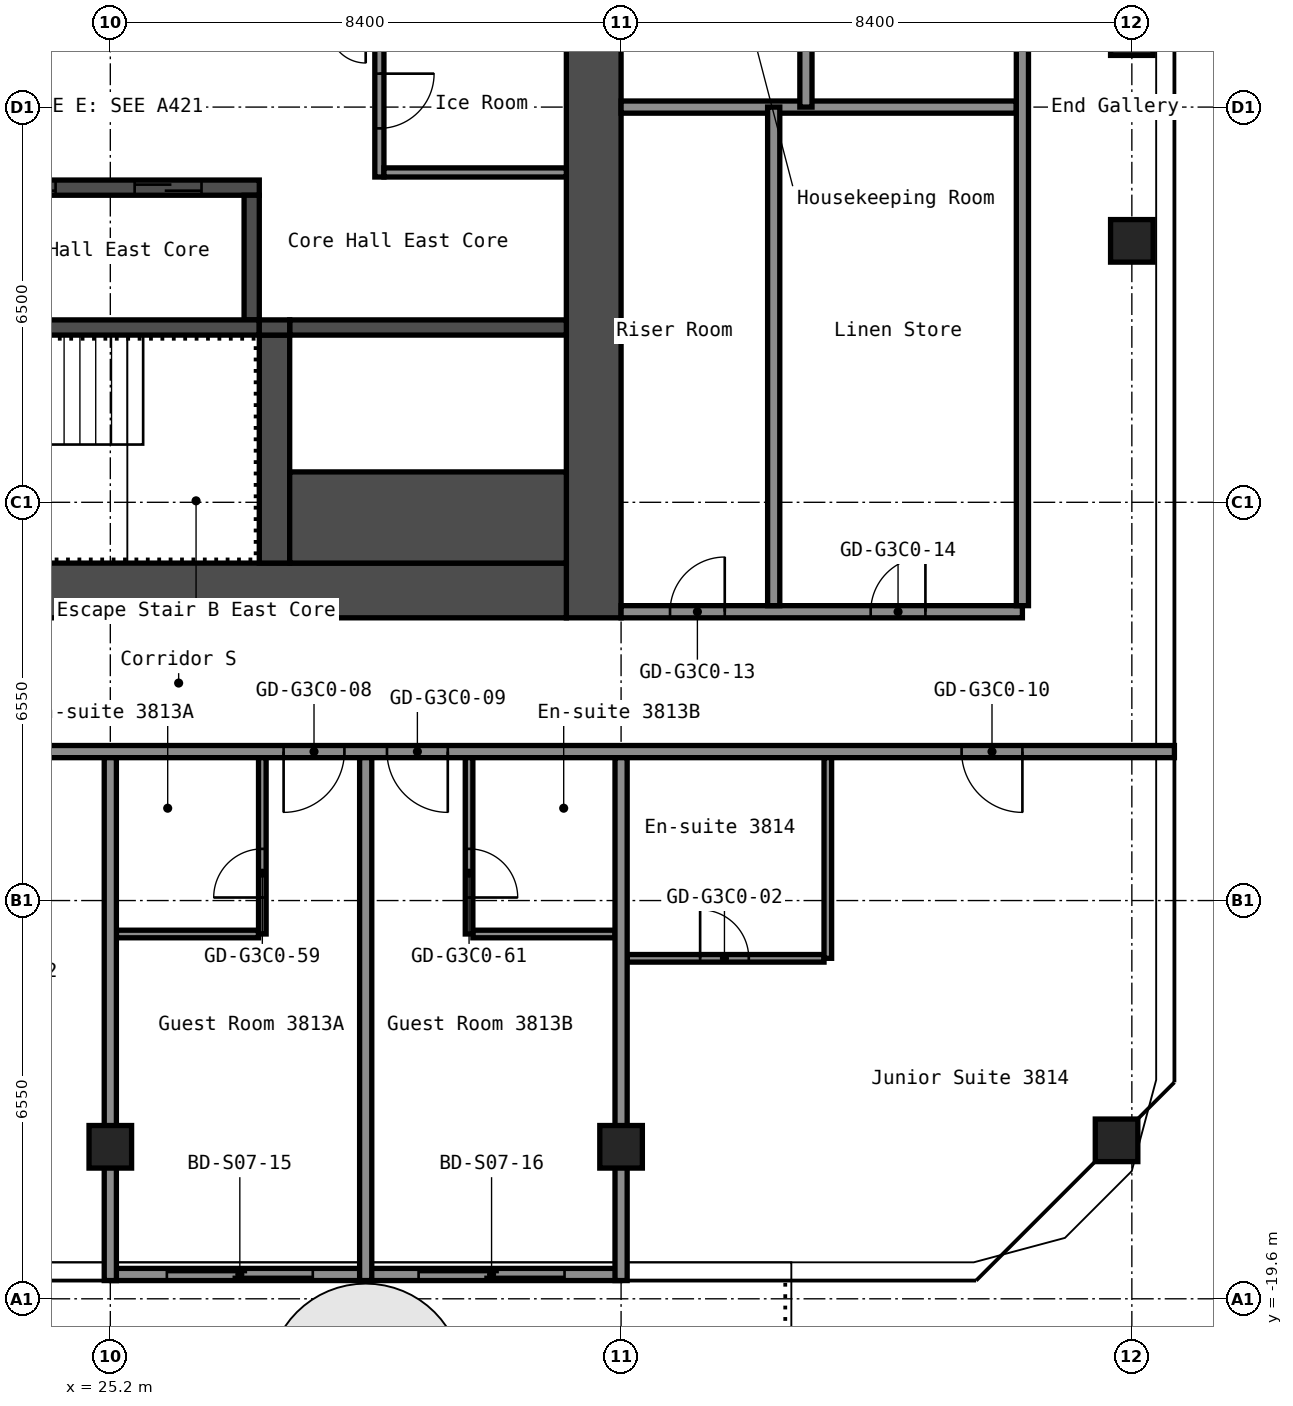
"""IFC4 building model, lengths in metres.
Left out: names, types, materials, properties, quantities, classifications, styles, units other than length and angle.
Written with IfcOpenShell. Run it as: python <this file> out.ifc"""

import sys

from ifc_helpers import new_model, si_unit, direction, frame, frame_2d, origin, origin_2d, place, context, subcontext, project, spatial, rectangle, hollow_rectangle, extrude, element, fill, save


model = new_model("IFC4")
c1 = context("Model", 3, precision=1e-05, world=origin(), true_north=direction((0.0, 1.0)))
c2 = subcontext(c1, "Body", "Model", "MODEL_VIEW")
j1 = project(units=[si_unit("LENGTHUNIT", "METRE"), si_unit("PLANEANGLEUNIT", "RADIAN")], contexts=[c1])
p1 = place(None, origin())
s1 = spatial("IfcSite", under=j1, at=p1, CompositionType="ELEMENT")
p2 = place(p1, origin())
s2 = spatial("IfcBuilding", under=s1, at=p2, CompositionType="ELEMENT")
p3 = place(p2, frame((0.0, 0.0, 137.4)))
s3 = spatial("IfcBuildingStorey", under=s2, at=p3, CompositionType="ELEMENT", Elevation=137.4)
for number, where, z_axis, x_axis in (
    (1, (25.2, -17.1, 0.0), (0.0, 0.0, 1.0), (1.0, 0.0, 0.0)),
    (2, (33.6, -17.1, 0.0), (0.0, 0.0, 1.0), (1.0, 0.0, 0.0)),
    (3, (41.749, -16.994, 0.0), (0.0, 0.0, 1.0), (1.0, 0.0, 0.0)),
    (4, (42.0, -2.2, 0.0), (0.0, 0.0, 1.0), (1.0, 0.0, 0.0)),
    (5, (42.0, 1.2, 0.0), (0.0, 0.0, 1.0), (1.0, 0.0, 0.0)),
):
    element("IfcColumn", number, at=place(p3, frame(where, z_axis=z_axis, x_axis=x_axis)), inside=s3, PredefinedType="COLUMN", context=c2, shape_type="SweptSolid", body=[
        extrude(hollow_rectangle(XDim=0.7, YDim=0.7, WallThickness=0.028, at=origin_2d()), origin(), (0.0, 0.0, 1.0), 2.75),
    ])
p4 = place(p3, frame((33.15, -8.4, 0.0), z_axis=(0.0, 0.0, 1.0), x_axis=(0.0, 1.0, 0.0)))
e6 = element("IfcWall", 6, at=p4, inside=s3, PredefinedType="SHEAR", context=c2, shape_type="SweptSolid", body=[
    extrude(rectangle(XDim=16.8, YDim=0.9, at=frame_2d((8.4, 0.0))), origin(), (0.0, 0.0, 1.0), 2.75),
])
p5 = place(p3, frame((17.7, -7.95, 0.0), z_axis=(0.0, 0.0, 1.0), x_axis=(1.0, 0.0, 0.0)))
e7 = element("IfcWall", 7, at=p5, inside=s3, PredefinedType="SHEAR", context=c2, shape_type="SweptSolid", body=[
    extrude(rectangle(XDim=15.0, YDim=0.9, at=frame_2d((7.5, 0.0))), origin(), (0.0, 0.0, 1.0), 2.75),
])
p6 = place(p5, frame((2.55, 0.0, 0.0)))
e8 = element("IfcOpeningElement", 8, at=p6, cuts=e7, PredefinedType="OPENING", context=c2, shape_type="SweptSolid", body=[
    extrude(rectangle(XDim=1.0, YDim=2.1, at=frame_2d((0.5, 1.05))), frame((0.0, 0.46, 0.0), z_axis=(0.0, -1.0, 0.0), x_axis=(1.0, 0.0, 0.0)), (0.0, 0.0, 1.0), 0.92),
])
p7 = place(p3, frame((20.15, -1.325, 0.0), z_axis=(0.0, 0.0, 1.0), x_axis=(1.0, 0.0, 0.0)))
e9 = element("IfcWall", 9, at=p7, inside=s3, PredefinedType="SHEAR", context=c2, shape_type="SweptSolid", body=[
    extrude(rectangle(XDim=7.5, YDim=0.25, at=frame_2d((3.75, 0.0))), origin(), (0.0, 0.0, 1.0), 2.75),
])
p8 = place(p7, frame((0.65, 0.0, 0.0)))
e10 = element("IfcOpeningElement", 10, at=p8, cuts=e9, PredefinedType="OPENING", context=c2, shape_type="SweptSolid", body=[
    extrude(rectangle(XDim=1.1, YDim=2.1, at=frame_2d((0.55, 1.05))), frame((0.0, 0.135, 0.0), z_axis=(0.0, -1.0, 0.0), x_axis=(1.0, 0.0, 0.0)), (0.0, 0.0, 1.0), 0.27),
])
p9 = place(p7, frame((3.05, 0.0, 0.0)))
e11 = element("IfcOpeningElement", 11, at=p9, cuts=e9, PredefinedType="OPENING", context=c2, shape_type="SweptSolid", body=[
    extrude(rectangle(XDim=1.1, YDim=2.1, at=frame_2d((0.55, 1.05))), frame((0.0, 0.135, 0.0), z_axis=(0.0, -1.0, 0.0), x_axis=(1.0, 0.0, 0.0)), (0.0, 0.0, 1.0), 0.27),
])
p10 = place(p7, frame((5.45, 0.0, 0.0)))
e12 = element("IfcOpeningElement", 12, at=p10, cuts=e9, PredefinedType="OPENING", context=c2, shape_type="SweptSolid", body=[
    extrude(rectangle(XDim=1.1, YDim=2.1, at=frame_2d((0.55, 1.05))), frame((0.0, 0.135, 0.0), z_axis=(0.0, -1.0, 0.0), x_axis=(1.0, 0.0, 0.0)), (0.0, 0.0, 1.0), 0.27),
])
p11 = place(p3, frame((27.525, -3.5, 0.0), z_axis=(0.0, 0.0, 1.0), x_axis=(0.0, 1.0, 0.0)))
e13 = element("IfcWall", 13, at=p11, inside=s3, PredefinedType="SHEAR", context=c2, shape_type="SweptSolid", body=[
    extrude(rectangle(XDim=2.05, YDim=0.25, at=frame_2d((1.025, 0.0))), origin(), (0.0, 0.0, 1.0), 2.75),
])
p12 = place(p3, frame((20.15, -3.625, 0.0), z_axis=(0.0, 0.0, 1.0), x_axis=(1.0, 0.0, 0.0)))
e14 = element("IfcWall", 14, at=p12, inside=s3, PredefinedType="SHEAR", context=c2, shape_type="SweptSolid", body=[
    extrude(rectangle(XDim=7.5, YDim=0.25, at=frame_2d((3.75, 0.0))), origin(), (0.0, 0.0, 1.0), 2.75),
])
p13 = place(p3, frame((27.9, -7.5, 0.0), z_axis=(0.0, 0.0, 1.0), x_axis=(0.0, 1.0, 0.0)))
e15 = element("IfcWall", 15, at=p13, inside=s3, PredefinedType="SHEAR", context=c2, shape_type="SweptSolid", body=[
    extrude(rectangle(XDim=3.75, YDim=0.5, at=frame_2d((1.875, 0.0))), origin(), (0.0, 0.0, 1.0), 2.75),
])
p14 = place(p3, frame((28.15, -3.625, 0.0), z_axis=(0.0, 0.0, 1.0), x_axis=(1.0, 0.0, 0.0)))
e16 = element("IfcWall", 16, at=p14, inside=s3, PredefinedType="SHEAR", context=c2, shape_type="SweptSolid", body=[
    extrude(rectangle(XDim=4.55, YDim=0.25, at=frame_2d((2.275, 0.0))), origin(), (0.0, 0.0, 1.0), 2.75),
])
p15 = place(p3, frame((28.15, -6.75, 0.0), z_axis=(0.0, 0.0, 1.0), x_axis=(1.0, 0.0, 0.0)))
e17 = element("IfcWall", 17, at=p15, inside=s3, PredefinedType="SHEAR", context=c2, shape_type="SweptSolid", body=[
    extrude(rectangle(XDim=4.55, YDim=1.5, at=frame_2d((2.275, 0.0))), origin(), (0.0, 0.0, 1.0), 2.75),
])
p16 = place(p3, frame((27.65, -3.625, 0.0), z_axis=(0.0, 0.0, 1.0), x_axis=(1.0, 0.0, 0.0)))
e18 = element("IfcWall", 18, at=p16, inside=s3, PredefinedType="SHEAR", context=c2, shape_type="SweptSolid", body=[
    extrude(rectangle(XDim=0.5, YDim=0.25, at=frame_2d((0.25, 0.0))), origin(), (0.0, 0.0, 1.0), 2.75),
])
p17 = place(p3, frame((29.625, -1.15, 0.0), z_axis=(0.0, 0.0, 1.0), x_axis=(0.0, 1.0, 0.0)))
e19 = element("IfcWall", 19, at=p17, inside=s3, PredefinedType="PARTITIONING", context=c2, shape_type="SweptSolid", body=[
    extrude(rectangle(XDim=2.35, YDim=0.15, at=frame_2d((1.175, 0.0))), origin(), (0.0, 0.0, 1.0), 2.75),
])
p18 = place(p17, frame((0.8, 0.0, 0.0)))
e20 = element("IfcOpeningElement", 20, at=p18, cuts=e19, PredefinedType="OPENING", context=c2, shape_type="SweptSolid", body=[
    extrude(rectangle(XDim=0.9, YDim=2.1, at=frame_2d((0.45, 1.05))), frame((0.0, 0.085, 0.0), z_axis=(0.0, -1.0, 0.0), x_axis=(1.0, 0.0, 0.0)), (0.0, 0.0, 1.0), 0.17),
])
p19 = place(p3, frame((29.7, -1.075, 0.0), z_axis=(0.0, 0.0, 1.0), x_axis=(1.0, 0.0, 0.0)))
e21 = element("IfcWall", 21, at=p19, inside=s3, PredefinedType="PARTITIONING", context=c2, shape_type="SweptSolid", body=[
    extrude(rectangle(XDim=3.0, YDim=0.15, at=frame_2d((1.5, 0.0))), origin(), (0.0, 0.0, 1.0), 2.75),
])
p20 = place(p3, frame((33.7, -14.0, 0.0), z_axis=(0.0, 0.0, 1.0), x_axis=(1.0, 0.0, 0.0)))
e22 = element("IfcWall", 22, at=p20, inside=s3, PredefinedType="PARTITIONING", context=c2, shape_type="SweptSolid", body=[
    extrude(rectangle(XDim=3.238, YDim=0.125, at=frame_2d((1.619, 0.0))), origin(), (0.0, 0.0, 1.0), 2.75),
])
p21 = place(p20, frame((1.2, 0.0, 0.0)))
e23 = element("IfcOpeningElement", 23, at=p21, cuts=e22, PredefinedType="OPENING", context=c2, shape_type="SweptSolid", body=[
    extrude(rectangle(XDim=0.8, YDim=2.1, at=frame_2d((0.4, 1.05))), frame((0.0, 0.073, 0.0), z_axis=(0.0, -1.0, 0.0), x_axis=(1.0, 0.0, 0.0)), (0.0, 0.0, 1.0), 0.145),
])
for number, where, z_axis, x_axis in (
    (24, (25.3, -13.6, 0.0), (0.0, 0.0, 1.0), (1.0, 0.0, 0.0)),
    (25, (31.163, -13.6, 0.0), (0.0, 0.0, 1.0), (1.0, 0.0, 0.0)),
):
    element("IfcWall", number, at=place(p3, frame(where, z_axis=z_axis, x_axis=x_axis)), inside=s3, PredefinedType="PARTITIONING", context=c2, shape_type="SweptSolid", body=[
        extrude(rectangle(XDim=2.337, YDim=0.125, at=frame_2d((1.169, 0.0))), origin(), (0.0, 0.0, 1.0), 2.75),
    ])
p22 = place(p3, frame((16.8, -10.6, 0.0), z_axis=(0.0, 0.0, 1.0), x_axis=(1.0, 0.0, 0.0)))
e26 = element("IfcWall", 26, at=p22, inside=s3, PredefinedType="PARTITIONING", context=c2, shape_type="SweptSolid", body=[
    extrude(rectangle(XDim=25.9, YDim=0.2, at=frame_2d((12.95, 0.0))), origin(), (0.0, 0.0, 1.0), 2.75),
])
p23 = place(p22, frame((5.4, 0.0, 0.0)))
e27 = element("IfcOpeningElement", 27, at=p23, cuts=e26, PredefinedType="OPENING", context=c2, shape_type="SweptSolid", body=[
    extrude(rectangle(XDim=1.0, YDim=2.1, at=frame_2d((0.5, 1.05))), frame((0.0, 0.11, 0.0), z_axis=(0.0, -1.0, 0.0), x_axis=(1.0, 0.0, 0.0)), (0.0, 0.0, 1.0), 0.22),
])
p24 = place(p22, frame((11.25, 0.0, 0.0)))
e28 = element("IfcOpeningElement", 28, at=p24, cuts=e26, PredefinedType="OPENING", context=c2, shape_type="SweptSolid", body=[
    extrude(rectangle(XDim=1.0, YDim=2.1, at=frame_2d((0.5, 1.05))), frame((0.0, 0.11, 0.0), z_axis=(0.0, -1.0, 0.0), x_axis=(1.0, 0.0, 0.0)), (0.0, 0.0, 1.0), 0.22),
])
p25 = place(p22, frame((12.95, 0.0, 0.0)))
e29 = element("IfcOpeningElement", 29, at=p25, cuts=e26, PredefinedType="OPENING", context=c2, shape_type="SweptSolid", body=[
    extrude(rectangle(XDim=1.0, YDim=2.1, at=frame_2d((0.5, 1.05))), frame((0.0, 0.11, 0.0), z_axis=(0.0, -1.0, 0.0), x_axis=(1.0, 0.0, 0.0)), (0.0, 0.0, 1.0), 0.22),
])
p26 = place(p22, frame((22.4, 0.0, 0.0)))
e30 = element("IfcOpeningElement", 30, at=p26, cuts=e26, PredefinedType="OPENING", context=c2, shape_type="SweptSolid", body=[
    extrude(rectangle(XDim=1.0, YDim=2.1, at=frame_2d((0.5, 1.05))), frame((0.0, 0.11, 0.0), z_axis=(0.0, -1.0, 0.0), x_axis=(1.0, 0.0, 0.0)), (0.0, 0.0, 1.0), 0.22),
])
p27 = place(p3, frame((33.6, -8.3, 0.0), z_axis=(0.0, 0.0, 1.0), x_axis=(1.0, 0.0, 0.0)))
e31 = element("IfcWall", 31, at=p27, inside=s3, PredefinedType="PARTITIONING", context=c2, shape_type="SweptSolid", body=[
    extrude(rectangle(XDim=6.6, YDim=0.2, at=frame_2d((3.3, 0.0))), origin(), (0.0, 0.0, 1.0), 2.75),
])
p28 = place(p27, frame((0.805, 0.0, 0.0)))
e32 = element("IfcOpeningElement", 32, at=p28, cuts=e31, PredefinedType="OPENING", context=c2, shape_type="SweptSolid", body=[
    extrude(rectangle(XDim=0.9, YDim=2.1, at=frame_2d((0.45, 1.05))), frame((0.0, 0.11, 0.0), z_axis=(0.0, -1.0, 0.0), x_axis=(1.0, 0.0, 0.0)), (0.0, 0.0, 1.0), 0.22),
])
p29 = place(p27, frame((4.105, 0.0, 0.0)))
e33 = element("IfcOpeningElement", 33, at=p29, cuts=e31, PredefinedType="OPENING", context=c2, shape_type="SweptSolid", body=[
    extrude(rectangle(XDim=0.9, YDim=2.1, at=frame_2d((0.45, 1.05))), frame((0.0, 0.11, 0.0), z_axis=(0.0, -1.0, 0.0), x_axis=(1.0, 0.0, 0.0)), (0.0, 0.0, 1.0), 0.22),
])
p30 = place(p3, frame((33.6, 0.0, 0.0), z_axis=(0.0, 0.0, 1.0), x_axis=(1.0, 0.0, 0.0)))
e34 = element("IfcWall", 34, at=p30, inside=s3, PredefinedType="PARTITIONING", context=c2, shape_type="SweptSolid", body=[
    extrude(rectangle(XDim=6.5, YDim=0.2, at=frame_2d((3.25, 0.0))), origin(), (0.0, 0.0, 1.0), 2.75),
])
p31 = place(p3, frame((25.2, -19.3, 0.0), z_axis=(0.0, 0.0, 1.0), x_axis=(0.0, 1.0, 0.0)))
e35 = element("IfcWall", 35, at=p31, inside=s3, PredefinedType="PARTITIONING", context=c2, shape_type="SweptSolid", body=[
    extrude(rectangle(XDim=8.6, YDim=0.2, at=frame_2d((4.3, 0.0))), origin(), (0.0, 0.0, 1.0), 2.75),
])
p32 = place(p3, frame((27.7, -13.6, 0.0), z_axis=(0.0, 0.0, 1.0), x_axis=(0.0, 1.0, 0.0)))
e36 = element("IfcWall", 36, at=p32, inside=s3, PredefinedType="PARTITIONING", context=c2, shape_type="SweptSolid", body=[
    extrude(rectangle(XDim=2.9, YDim=0.125, at=frame_2d((1.45, 0.0))), origin(), (0.0, 0.0, 1.0), 2.75),
])
p33 = place(p32, frame((0.6, 0.0, 0.0)))
e37 = element("IfcOpeningElement", 37, at=p33, cuts=e36, PredefinedType="OPENING", context=c2, shape_type="SweptSolid", body=[
    extrude(rectangle(XDim=0.8, YDim=2.1, at=frame_2d((0.4, 1.05))), frame((0.0, 0.073, 0.0), z_axis=(0.0, -1.0, 0.0), x_axis=(1.0, 0.0, 0.0)), (0.0, 0.0, 1.0), 0.145),
])
p34 = place(p3, frame((29.4, -19.3, 0.0), z_axis=(0.0, 0.0, 1.0), x_axis=(0.0, 1.0, 0.0)))
e38 = element("IfcWall", 38, at=p34, inside=s3, PredefinedType="PARTITIONING", context=c2, shape_type="SweptSolid", body=[
    extrude(rectangle(XDim=8.6, YDim=0.2, at=frame_2d((4.3, 0.0))), origin(), (0.0, 0.0, 1.0), 2.75),
])
p35 = place(p3, frame((31.1, -13.6, 0.0), z_axis=(0.0, 0.0, 1.0), x_axis=(0.0, 1.0, 0.0)))
e39 = element("IfcWall", 39, at=p35, inside=s3, PredefinedType="PARTITIONING", context=c2, shape_type="SweptSolid", body=[
    extrude(rectangle(XDim=2.9, YDim=0.125, at=frame_2d((1.45, 0.0))), origin(), (0.0, 0.0, 1.0), 2.75),
])
p36 = place(p35, frame((0.6, 0.0, 0.0)))
e40 = element("IfcOpeningElement", 40, at=p36, cuts=e39, PredefinedType="OPENING", context=c2, shape_type="SweptSolid", body=[
    extrude(rectangle(XDim=0.8, YDim=2.1, at=frame_2d((0.4, 1.05))), frame((0.0, 0.073, 0.0), z_axis=(0.0, -1.0, 0.0), x_axis=(1.0, 0.0, 0.0)), (0.0, 0.0, 1.0), 0.145),
])
p37 = place(p3, frame((33.6, -19.3, 0.0), z_axis=(0.0, 0.0, 1.0), x_axis=(0.0, 1.0, 0.0)))
e41 = element("IfcWall", 41, at=p37, inside=s3, PredefinedType="PARTITIONING", context=c2, shape_type="SweptSolid", body=[
    extrude(rectangle(XDim=8.6, YDim=0.2, at=frame_2d((4.3, 0.0))), origin(), (0.0, 0.0, 1.0), 2.75),
])
for number, where, z_axis, x_axis in (
    (42, (36.11, -8.2, 0.0), (0.0, 0.0, 1.0), (0.0, 1.0, 0.0)),
    (43, (36.64, 0.0, 0.0), (0.0, 0.0, 1.0), (0.0, 1.0, 0.0)),
):
    element("IfcWall", number, at=place(p3, frame(where, z_axis=z_axis, x_axis=x_axis)), inside=s3, PredefinedType="PARTITIONING", context=c2, shape_type="SweptSolid", body=[
        extrude(rectangle(XDim=8.2, YDim=0.2, at=frame_2d((4.1, 0.0))), origin(), (0.0, 0.0, 1.0), 2.75),
    ])
p38 = place(p3, frame((37.0, -14.0, 0.0), z_axis=(0.0, 0.0, 1.0), x_axis=(0.0, 1.0, 0.0)))
e44 = element("IfcWall", 44, at=p38, inside=s3, PredefinedType="PARTITIONING", context=c2, shape_type="SweptSolid", body=[
    extrude(rectangle(XDim=3.3, YDim=0.125, at=frame_2d((1.65, 0.0))), origin(), (0.0, 0.0, 1.0), 2.75),
])
p39 = place(p3, frame((40.2, -8.2, 0.0), z_axis=(0.0, 0.0, 1.0), x_axis=(0.0, 1.0, 0.0)))
e45 = element("IfcWall", 45, at=p39, inside=s3, PredefinedType="PARTITIONING", context=c2, shape_type="SweptSolid", body=[
    extrude(rectangle(XDim=16.4, YDim=0.2, at=frame_2d((8.2, 0.0))), origin(), (0.0, 0.0, 1.0), 2.75),
])
p40 = place(p3, frame((25.22, -19.2, 0.0), z_axis=(0.0, 0.0, 1.0), x_axis=(1.0, 0.0, 0.0)))
p41 = place(p40, frame((0.91, 0.0, 0.0)))
p42 = place(p41, frame((2.4, 0.0, 0.0), z_axis=(0.0, 0.0, 1.0), x_axis=(-1.0, 0.0, 0.0)))
e46 = element("IfcDoor", 46, at=p42, inside=s3, OperationType="SLIDING_TO_LEFT", PredefinedType="DOOR", context=c2, shape_type="SweptSolid", body=[
    extrude(rectangle(XDim=2.4, YDim=2.2, at=frame_2d((1.2, 1.1))), frame((0.0, 0.025, 0.0), z_axis=(0.0, -1.0, 0.0), x_axis=(1.0, 0.0, 0.0)), (0.0, 0.0, 1.0), 0.05),
])
p43 = place(p3, frame((29.36, -19.2, 0.0), z_axis=(0.0, 0.0, 1.0), x_axis=(1.0, 0.0, 0.0)))
p44 = place(p43, frame((0.91, 0.0, 0.0)))
p45 = place(p44, frame((2.4, 0.0, 0.0), z_axis=(0.0, 0.0, 1.0), x_axis=(-1.0, 0.0, 0.0)))
e47 = element("IfcDoor", 47, at=p45, inside=s3, OperationType="SLIDING_TO_LEFT", PredefinedType="DOOR", context=c2, shape_type="SweptSolid", body=[
    extrude(rectangle(XDim=2.4, YDim=2.2, at=frame_2d((1.2, 1.1))), frame((0.0, 0.025, 0.0), z_axis=(0.0, -1.0, 0.0), x_axis=(1.0, 0.0, 0.0)), (0.0, 0.0, 1.0), 0.05),
])
p46 = place(p18, origin())
e48 = element("IfcDoor", 48, at=p46, inside=s3, OperationType="SINGLE_SWING_RIGHT", PredefinedType="DOOR", context=c2, shape_type="SweptSolid", body=[
    extrude(rectangle(XDim=0.9, YDim=2.1, at=frame_2d((0.45, 1.05))), frame((0.0, 0.025, 0.0), z_axis=(0.0, -1.0, 0.0), x_axis=(1.0, 0.0, 0.0)), (0.0, 0.0, 1.0), 0.05),
])
fill(e20, e48)
p47 = place(p9, origin())
e49 = element("IfcDoor", 49, at=p47, inside=s3, OperationType="DOUBLE_DOOR_SLIDING", PredefinedType="DOOR", context=c2, shape_type="SweptSolid", body=[
    extrude(rectangle(XDim=1.1, YDim=2.1, at=frame_2d((0.55, 1.05))), frame((0.0, 0.025, 0.0), z_axis=(0.0, -1.0, 0.0), x_axis=(1.0, 0.0, 0.0)), (0.0, 0.0, 1.0), 0.05),
])
fill(e11, e49)
p48 = place(p10, origin())
e50 = element("IfcDoor", 50, at=p48, inside=s3, OperationType="DOUBLE_DOOR_SLIDING", PredefinedType="DOOR", context=c2, shape_type="SweptSolid", body=[
    extrude(rectangle(XDim=1.1, YDim=2.1, at=frame_2d((0.55, 1.05))), frame((0.0, 0.025, 0.0), z_axis=(0.0, -1.0, 0.0), x_axis=(1.0, 0.0, 0.0)), (0.0, 0.0, 1.0), 0.05),
])
fill(e12, e50)
p49 = place(p21, origin())
e51 = element("IfcDoor", 51, at=p49, inside=s3, OperationType="SINGLE_SWING_RIGHT", PredefinedType="DOOR", context=c2, shape_type="SweptSolid", body=[
    extrude(rectangle(XDim=0.8, YDim=2.1, at=frame_2d((0.4, 1.05))), frame((0.0, 0.025, 0.0), z_axis=(0.0, -1.0, 0.0), x_axis=(1.0, 0.0, 0.0)), (0.0, 0.0, 1.0), 0.05),
])
fill(e23, e51)
p50 = place(p24, origin())
e52 = element("IfcDoor", 52, at=p50, inside=s3, OperationType="SINGLE_SWING_LEFT", PredefinedType="DOOR", context=c2, shape_type="SweptSolid", body=[
    extrude(rectangle(XDim=1.0, YDim=2.1, at=frame_2d((0.5, 1.05))), frame((0.0, 0.025, 0.0), z_axis=(0.0, -1.0, 0.0), x_axis=(1.0, 0.0, 0.0)), (0.0, 0.0, 1.0), 0.05),
])
fill(e28, e52)
p51 = place(p25, origin())
e53 = element("IfcDoor", 53, at=p51, inside=s3, OperationType="SINGLE_SWING_RIGHT", PredefinedType="DOOR", context=c2, shape_type="SweptSolid", body=[
    extrude(rectangle(XDim=1.0, YDim=2.1, at=frame_2d((0.5, 1.05))), frame((0.0, 0.025, 0.0), z_axis=(0.0, -1.0, 0.0), x_axis=(1.0, 0.0, 0.0)), (0.0, 0.0, 1.0), 0.05),
])
fill(e29, e53)
p52 = place(p26, origin())
e54 = element("IfcDoor", 54, at=p52, inside=s3, OperationType="SINGLE_SWING_RIGHT", PredefinedType="DOOR", context=c2, shape_type="SweptSolid", body=[
    extrude(rectangle(XDim=1.0, YDim=2.1, at=frame_2d((0.5, 1.05))), frame((0.0, 0.025, 0.0), z_axis=(0.0, -1.0, 0.0), x_axis=(1.0, 0.0, 0.0)), (0.0, 0.0, 1.0), 0.05),
])
fill(e30, e54)
p53 = place(p28, origin())
e55 = element("IfcDoor", 55, at=p53, inside=s3, OperationType="SINGLE_SWING_LEFT", PredefinedType="DOOR", context=c2, shape_type="SweptSolid", body=[
    extrude(rectangle(XDim=0.9, YDim=2.1, at=frame_2d((0.45, 1.05))), frame((0.0, 0.025, 0.0), z_axis=(0.0, -1.0, 0.0), x_axis=(1.0, 0.0, 0.0)), (0.0, 0.0, 1.0), 0.05),
])
fill(e32, e55)
p54 = place(p29, origin())
e56 = element("IfcDoor", 56, at=p54, inside=s3, OperationType="SINGLE_SWING_LEFT", PredefinedType="DOOR", context=c2, shape_type="SweptSolid", body=[
    extrude(rectangle(XDim=0.9, YDim=2.1, at=frame_2d((0.45, 1.05))), frame((0.0, 0.025, 0.0), z_axis=(0.0, -1.0, 0.0), x_axis=(1.0, 0.0, 0.0)), (0.0, 0.0, 1.0), 0.05),
])
fill(e33, e56)
p55 = place(p33, origin())
e57 = element("IfcDoor", 57, at=p55, inside=s3, OperationType="SINGLE_SWING_RIGHT", PredefinedType="DOOR", context=c2, shape_type="SweptSolid", body=[
    extrude(rectangle(XDim=0.8, YDim=2.1, at=frame_2d((0.4, 1.05))), frame((0.0, 0.025, 0.0), z_axis=(0.0, -1.0, 0.0), x_axis=(1.0, 0.0, 0.0)), (0.0, 0.0, 1.0), 0.05),
])
fill(e37, e57)
p56 = place(p36, origin())
e58 = element("IfcDoor", 58, at=p56, inside=s3, OperationType="SINGLE_SWING_LEFT", PredefinedType="DOOR", context=c2, shape_type="SweptSolid", body=[
    extrude(rectangle(XDim=0.8, YDim=2.1, at=frame_2d((0.4, 1.05))), frame((0.0, 0.025, 0.0), z_axis=(0.0, -1.0, 0.0), x_axis=(1.0, 0.0, 0.0)), (0.0, 0.0, 1.0), 0.05),
])
fill(e40, e58)
save(model, sys.argv[1])
